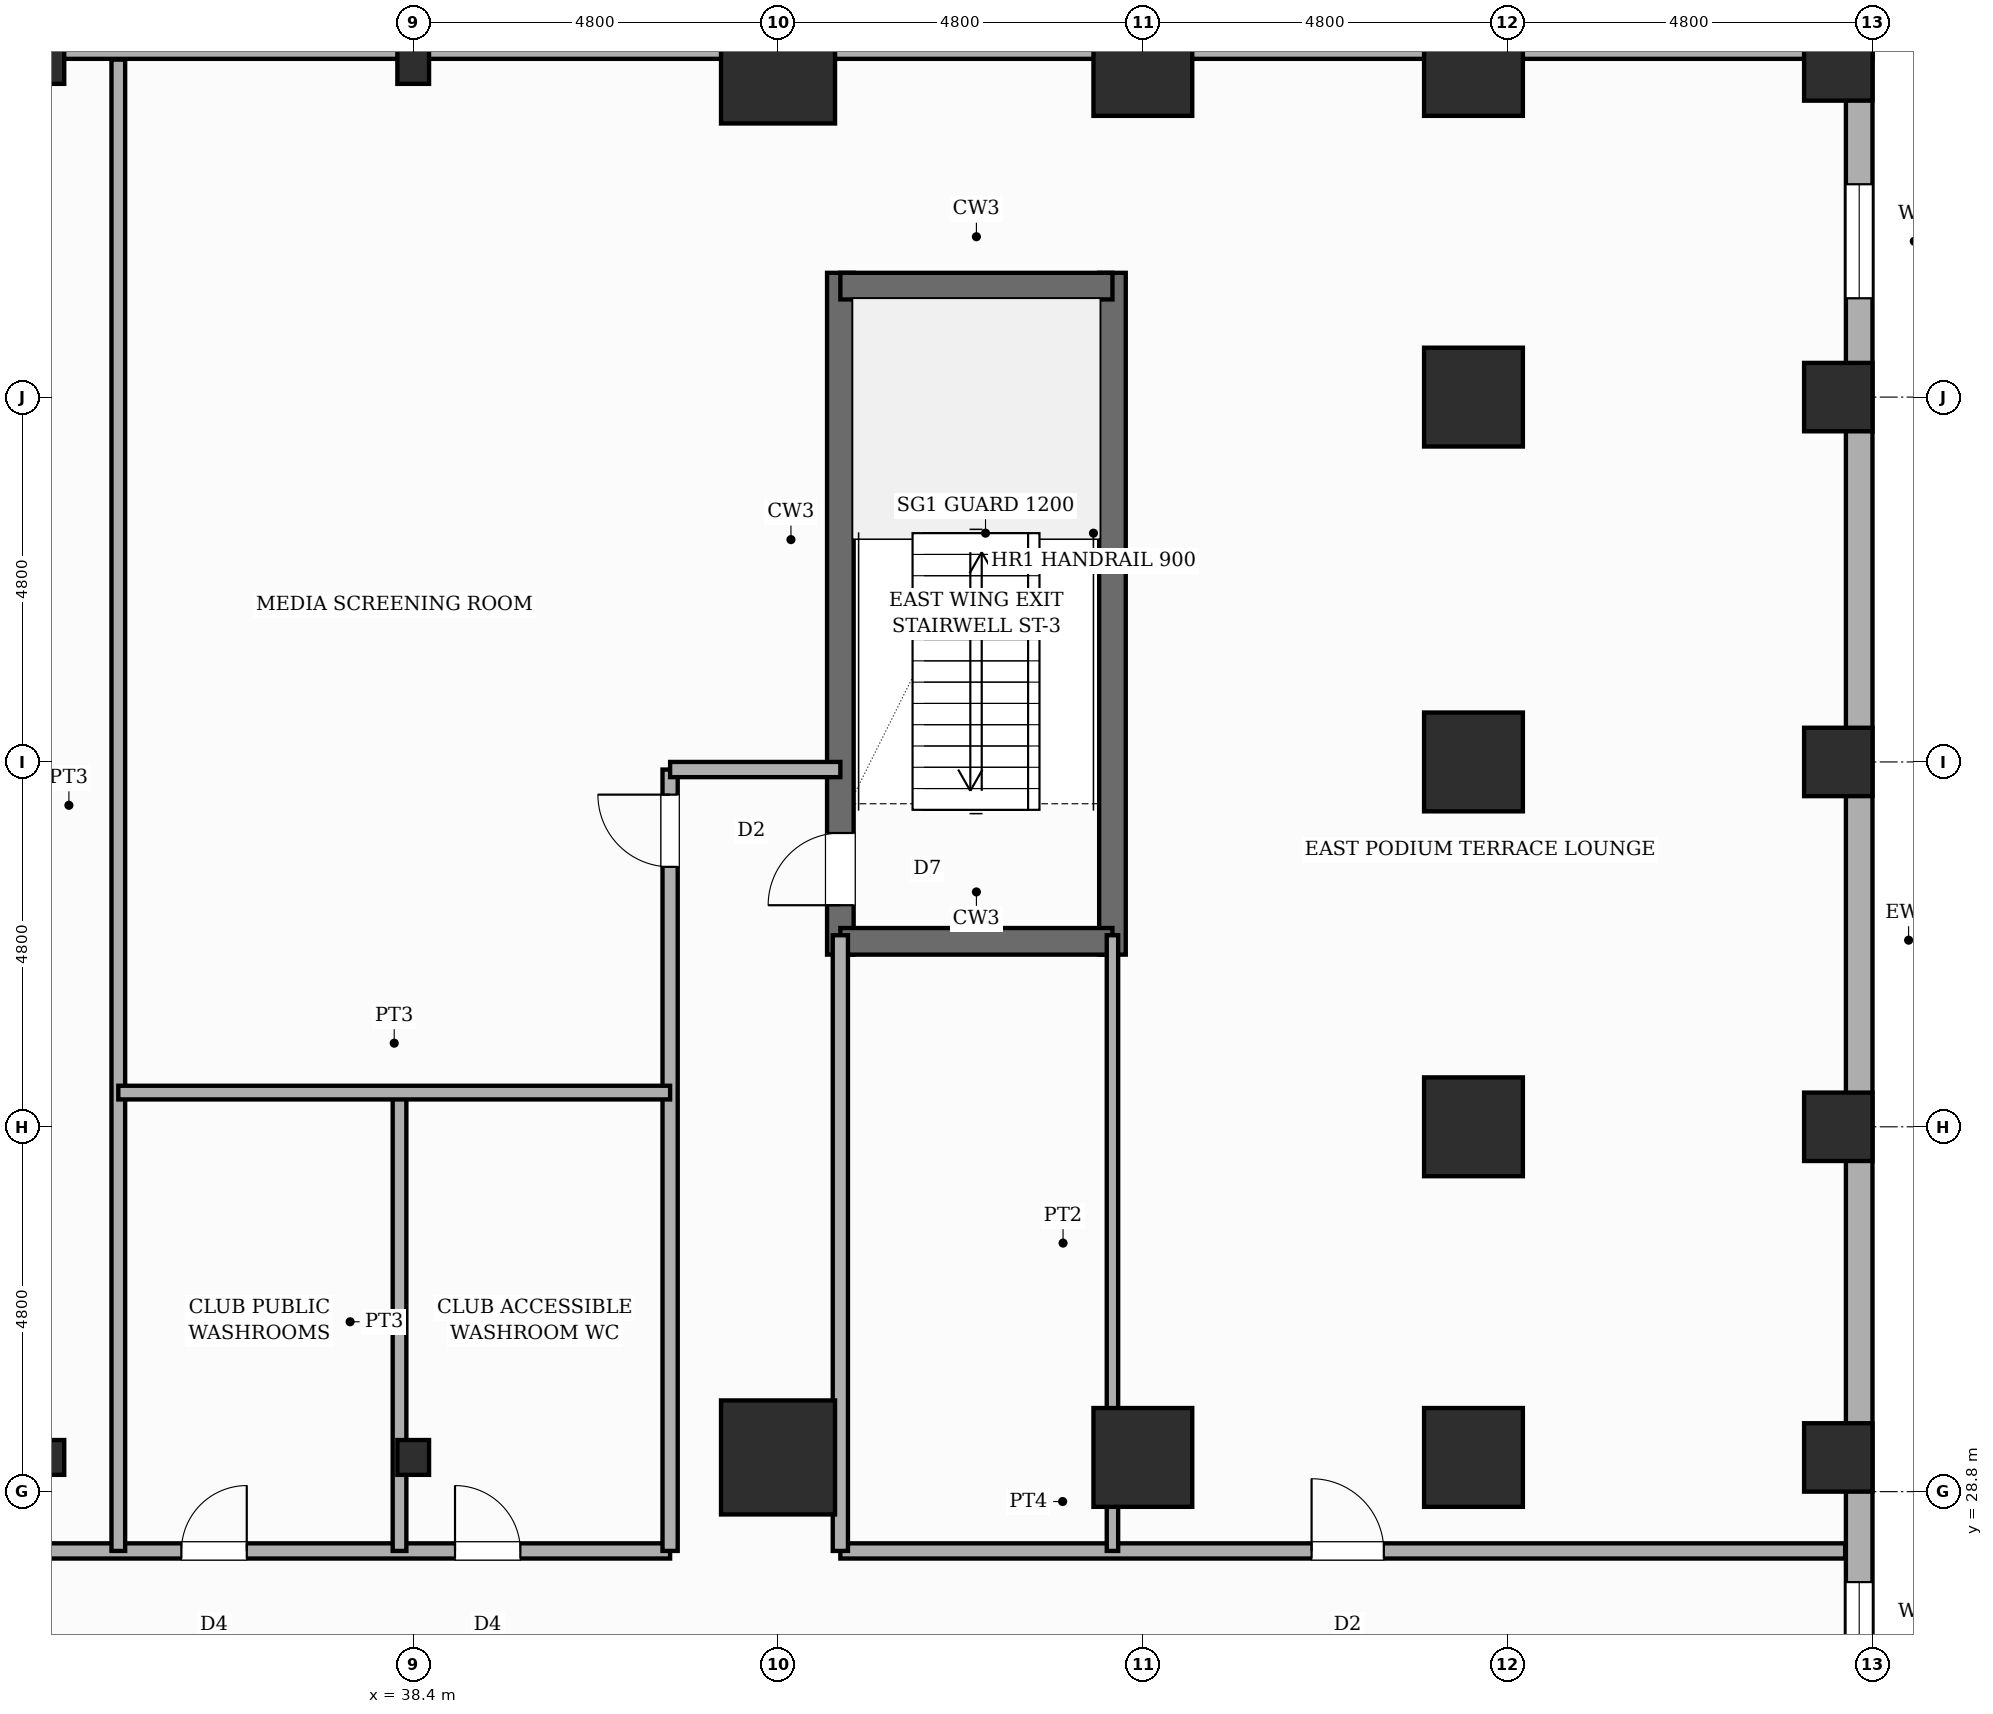
"""IFC4 building model, lengths in metres.
Left out: names, types, materials, properties, quantities, classifications, styles, units other than length and angle.
Written with IfcOpenShell. Run it as: python <this file> out.ifc"""

import sys

from ifc_helpers import new_model, si_unit, direction, frame, frame_2d, origin, origin_2d, place, context, subcontext, project, spatial, rectangle, circle, i_section, extrude, element, fill, save


model = new_model("IFC4")
c1 = context("Model", 3, precision=1e-05, world=origin(), true_north=direction((0.0, 1.0)))
c2 = subcontext(c1, "Body", "Model", "MODEL_VIEW")
j1 = project(units=[si_unit("LENGTHUNIT", "METRE"), si_unit("PLANEANGLEUNIT", "RADIAN")], contexts=[c1])
p1 = place(None, origin())
s1 = spatial("IfcSite", under=j1, at=p1, CompositionType="ELEMENT")
p2 = place(p1, origin())
s2 = spatial("IfcBuilding", under=s1, at=p2, CompositionType="ELEMENT")
p3 = place(p2, frame((0.0, 0.0, 14.8)))
s3 = spatial("IfcBuildingStorey", under=s2, at=p3, CompositionType="ELEMENT", Elevation=14.8)
p4 = place(p3, frame((44.02, 35.865, 0.0), z_axis=(0.0, 0.0, 1.0), x_axis=(0.0, 1.0, 0.0)))
e1 = element("IfcWall", 1, at=p4, inside=s3, PredefinedType="SHEAR", context=c2, shape_type="SweptSolid", body=[
    extrude(rectangle(XDim=8.97, YDim=0.35, at=frame_2d((4.485, 0.0))), origin(), (0.0, 0.0, 1.0), 4.8),
])
p5 = place(p4, frame((0.65, 0.0, 0.0)))
e2 = element("IfcOpeningElement", 2, at=p5, cuts=e1, PredefinedType="OPENING", context=c2, shape_type="SweptSolid", body=[
    extrude(rectangle(XDim=0.95, YDim=2.1, at=frame_2d((0.475, 1.05))), frame((0.0, 0.185, 0.0), z_axis=(0.0, -1.0, 0.0), x_axis=(1.0, 0.0, 0.0)), (0.0, 0.0, 1.0), 0.37),
])
p6 = place(p3, frame((47.6, 35.865, 0.0), z_axis=(0.0, 0.0, 1.0), x_axis=(0.0, 1.0, 0.0)))
e3 = element("IfcWall", 3, at=p6, inside=s3, PredefinedType="SHEAR", context=c2, shape_type="SweptSolid", body=[
    extrude(rectangle(XDim=8.97, YDim=0.35, at=frame_2d((4.485, 0.0))), origin(), (0.0, 0.0, 1.0), 4.8),
])
for number, where, z_axis, x_axis in (
    (4, (44.02, 36.04, 0.0), (0.0, 0.0, 1.0), (1.0, 0.0, 0.0)),
    (5, (44.02, 44.66, 0.0), (0.0, 0.0, 1.0), (1.0, 0.0, 0.0)),
):
    element("IfcWall", number, at=place(p3, frame(where, z_axis=z_axis, x_axis=x_axis)), inside=s3, PredefinedType="SHEAR", context=c2, shape_type="SweptSolid", body=[
        extrude(rectangle(XDim=3.58, YDim=0.35, at=frame_2d((1.79, 0.0))), origin(), (0.0, 0.0, 1.0), 4.8),
    ])
for number, where, z_axis, x_axis in (
    (6, (33.6, 29.25, 0.0), (0.0, 0.0, 1.0), (1.0, 0.0, 0.0)),
    (7, (33.6, 47.55, 0.0), (0.0, 0.0, 1.0), (1.0, 0.0, 0.0)),
    (8, (38.4, 29.25, 0.0), (0.0, 0.0, 1.0), (1.0, 0.0, 0.0)),
    (9, (38.4, 47.55, 0.0), (0.0, 0.0, 1.0), (1.0, 0.0, 0.0)),
):
    element("IfcColumn", number, at=place(p3, frame(where, z_axis=z_axis, x_axis=x_axis)), inside=s3, PredefinedType="COLUMN", context=c2, shape_type="SweptSolid", body=[
        extrude(i_section(OverallWidth=0.417, OverallDepth=0.458, WebThickness=0.03, FlangeThickness=0.045, FilletRadius=0.022, at=origin_2d()), origin(), (0.0, 0.0, 1.0), 4.8),
    ])
for number, where, z_axis, x_axis in (
    (10, (43.2, 29.25, 0.0), (0.0, 0.0, 1.0), (1.0, 0.0, 0.0)),
    (11, (43.2, 47.55, 0.0), (0.0, 0.0, 1.0), (1.0, 0.0, 0.0)),
):
    element("IfcColumn", number, at=place(p3, frame(where, z_axis=z_axis, x_axis=x_axis)), inside=s3, PredefinedType="USERDEFINED", context=c2, shape_type="SweptSolid", body=[
        extrude(rectangle(XDim=1.5, YDim=1.5, at=origin_2d()), origin(), (0.0, 0.0, 1.0), 4.8),
    ])
for number, where, z_axis, x_axis in (
    (12, (48.0, 29.25, 0.0), (0.0, 0.0, 1.0), (1.0, 0.0, 0.0)),
    (13, (48.0, 47.55, 0.0), (0.0, 0.0, 1.0), (1.0, 0.0, 0.0)),
    (14, (52.35, 29.25, 0.0), (0.0, 0.0, 1.0), (1.0, 0.0, 0.0)),
    (15, (52.35, 33.6, 0.0), (0.0, 0.0, 1.0), (1.0, 0.0, 0.0)),
    (16, (52.35, 38.4, 0.0), (0.0, 0.0, 1.0), (1.0, 0.0, 0.0)),
    (17, (52.35, 43.2, 0.0), (0.0, 0.0, 1.0), (1.0, 0.0, 0.0)),
    (18, (52.35, 47.55, 0.0), (0.0, 0.0, 1.0), (1.0, 0.0, 0.0)),
):
    element("IfcColumn", number, at=place(p3, frame(where, z_axis=z_axis, x_axis=x_axis)), inside=s3, PredefinedType="COLUMN", context=c2, shape_type="SweptSolid", body=[
        extrude(rectangle(XDim=1.3, YDim=1.3, at=origin_2d()), origin(), (0.0, 0.0, 1.0), 4.8),
    ])
for number, where, z_axis, x_axis in (
    (19, (57.15, 29.25, 0.0), (0.0, 0.0, 1.0), (1.0, 0.0, 0.0)),
    (20, (57.15, 33.6, 0.0), (0.0, 0.0, 1.0), (1.0, 0.0, 0.0)),
    (21, (57.15, 38.4, 0.0), (0.0, 0.0, 1.0), (1.0, 0.0, 0.0)),
    (22, (57.15, 43.2, 0.0), (0.0, 0.0, 1.0), (1.0, 0.0, 0.0)),
    (23, (57.15, 47.55, 0.0), (0.0, 0.0, 1.0), (1.0, 0.0, 0.0)),
):
    element("IfcColumn", number, at=place(p3, frame(where, z_axis=z_axis, x_axis=x_axis)), inside=s3, PredefinedType="COLUMN", context=c2, shape_type="SweptSolid", body=[
        extrude(circle(Radius=0.45, at=origin_2d()), origin(), (0.0, 0.0, 1.0), 4.8),
    ])
p7 = place(p3, frame((0.0, 47.825, 0.0), z_axis=(0.0, 0.0, 1.0), x_axis=(1.0, 0.0, 0.0)))
e24 = element("IfcWall", 24, at=p7, inside=s3, PredefinedType="STANDARD", context=c2, shape_type="SweptSolid", body=[
    extrude(rectangle(XDim=57.6, YDim=0.35, at=frame_2d((28.8, 0.0))), origin(), (0.0, 0.0, 1.0), 2.98),
])
p8 = place(p3, frame((57.425, 48.0, 0.0), z_axis=(0.0, 0.0, 1.0), x_axis=(0.0, -1.0, 0.0)))
e25 = element("IfcWall", 25, at=p8, inside=s3, PredefinedType="STANDARD", context=c2, shape_type="SweptSolid", body=[
    extrude(rectangle(XDim=38.4, YDim=0.35, at=frame_2d((19.2, 0.0))), origin(), (0.0, 0.0, 1.0), 3.48),
])
p9 = place(p8, frame((20.39, 0.0, 0.85)))
e26 = element("IfcOpeningElement", 26, at=p9, cuts=e25, PredefinedType="OPENING", context=c2, shape_type="SweptSolid", body=[
    extrude(rectangle(XDim=1.5, YDim=2.1, at=frame_2d((0.75, 1.05))), frame((0.0, 0.185, 0.0), z_axis=(0.0, -1.0, 0.0), x_axis=(1.0, 0.0, 0.0)), (0.0, 0.0, 1.0), 0.37),
])
p10 = place(p8, frame((2.0, 0.0, 0.85)))
e27 = element("IfcOpeningElement", 27, at=p10, cuts=e25, PredefinedType="OPENING", context=c2, shape_type="SweptSolid", body=[
    extrude(rectangle(XDim=1.5, YDim=2.1, at=frame_2d((0.75, 1.05))), frame((0.0, 0.185, 0.0), z_axis=(0.0, -1.0, 0.0), x_axis=(1.0, 0.0, 0.0)), (0.0, 0.0, 1.0), 0.37),
])
p11 = place(p8, frame((24.585, 0.0, 0.85)))
e28 = element("IfcOpeningElement", 28, at=p11, cuts=e25, PredefinedType="OPENING", context=c2, shape_type="SweptSolid", body=[
    extrude(rectangle(XDim=1.5, YDim=2.1, at=frame_2d((0.75, 1.05))), frame((0.0, 0.185, 0.0), z_axis=(0.0, -1.0, 0.0), x_axis=(1.0, 0.0, 0.0)), (0.0, 0.0, 1.0), 0.37),
])
p12 = place(p3, frame((22.75, 28.02, 0.0), z_axis=(0.0, 0.0, 1.0), x_axis=(1.0, 0.0, 0.0)))
e29 = element("IfcWall", 29, at=p12, inside=s3, PredefinedType="PARTITIONING", context=c2, shape_type="SweptSolid", body=[
    extrude(rectangle(XDim=19.03, YDim=0.2, at=frame_2d((9.515, 0.0))), origin(), (0.0, 0.0, 1.0), 4.4),
])
p13 = place(p12, frame((4.65, 0.0, 0.0)))
e30 = element("IfcOpeningElement", 30, at=p13, cuts=e29, PredefinedType="OPENING", context=c2, shape_type="SweptSolid", body=[
    extrude(rectangle(XDim=0.95, YDim=2.15, at=frame_2d((0.475, 1.075))), frame((0.0, 0.11, 0.0), z_axis=(0.0, -1.0, 0.0), x_axis=(1.0, 0.0, 0.0)), (0.0, 0.0, 1.0), 0.22),
])
p14 = place(p12, frame((12.6, 0.0, 0.0)))
e31 = element("IfcOpeningElement", 31, at=p14, cuts=e29, PredefinedType="OPENING", context=c2, shape_type="SweptSolid", body=[
    extrude(rectangle(XDim=0.86, YDim=2.1, at=frame_2d((0.43, 1.05))), frame((0.0, 0.11, 0.0), z_axis=(0.0, -1.0, 0.0), x_axis=(1.0, 0.0, 0.0)), (0.0, 0.0, 1.0), 0.22),
])
p15 = place(p12, frame((16.2, 0.0, 0.0)))
e32 = element("IfcOpeningElement", 32, at=p15, cuts=e29, PredefinedType="OPENING", context=c2, shape_type="SweptSolid", body=[
    extrude(rectangle(XDim=0.86, YDim=2.1, at=frame_2d((0.43, 1.05))), frame((0.0, 0.11, 0.0), z_axis=(0.0, -1.0, 0.0), x_axis=(1.0, 0.0, 0.0)), (0.0, 0.0, 1.0), 0.22),
])
p16 = place(p3, frame((44.02, 28.02, 0.0), z_axis=(0.0, 0.0, 1.0), x_axis=(1.0, 0.0, 0.0)))
e33 = element("IfcWall", 33, at=p16, inside=s3, PredefinedType="PARTITIONING", context=c2, shape_type="SweptSolid", body=[
    extrude(rectangle(XDim=13.22, YDim=0.2, at=frame_2d((6.61, 0.0))), origin(), (0.0, 0.0, 1.0), 4.4),
])
p17 = place(p16, frame((6.2, 0.0, 0.0)))
e34 = element("IfcOpeningElement", 34, at=p17, cuts=e33, PredefinedType="OPENING", context=c2, shape_type="SweptSolid", body=[
    extrude(rectangle(XDim=0.95, YDim=2.15, at=frame_2d((0.475, 1.075))), frame((0.0, 0.11, 0.0), z_axis=(0.0, -1.0, 0.0), x_axis=(1.0, 0.0, 0.0)), (0.0, 0.0, 1.0), 0.22),
])
p18 = place(p3, frame((41.78, 28.02, 0.0), z_axis=(0.0, 0.0, 1.0), x_axis=(0.0, 1.0, 0.0)))
e35 = element("IfcWall", 35, at=p18, inside=s3, PredefinedType="PARTITIONING", context=c2, shape_type="SweptSolid", body=[
    extrude(rectangle(XDim=10.28, YDim=0.2, at=frame_2d((5.14, 0.0))), origin(), (0.0, 0.0, 1.0), 4.4),
])
p19 = place(p18, frame((9.0, 0.0, 0.0)))
e36 = element("IfcOpeningElement", 36, at=p19, cuts=e35, PredefinedType="OPENING", context=c2, shape_type="SweptSolid", body=[
    extrude(rectangle(XDim=0.95, YDim=2.15, at=frame_2d((0.475, 1.075))), frame((0.0, 0.11, 0.0), z_axis=(0.0, -1.0, 0.0), x_axis=(1.0, 0.0, 0.0)), (0.0, 0.0, 1.0), 0.22),
])
p20 = place(p3, frame((44.02, 28.02, 0.0), z_axis=(0.0, 0.0, 1.0), x_axis=(0.0, 1.0, 0.0)))
e37 = element("IfcWall", 37, at=p20, inside=s3, PredefinedType="PARTITIONING", context=c2, shape_type="SweptSolid", body=[
    extrude(rectangle(XDim=8.1, YDim=0.2, at=frame_2d((4.05, 0.0))), origin(), (0.0, 0.0, 1.0), 4.4),
])
p21 = place(p3, frame((41.78, 38.3, 0.0), z_axis=(0.0, 0.0, 1.0), x_axis=(1.0, 0.0, 0.0)))
e38 = element("IfcWall", 38, at=p21, inside=s3, PredefinedType="PARTITIONING", context=c2, shape_type="SweptSolid", body=[
    extrude(rectangle(XDim=2.24, YDim=0.2, at=frame_2d((1.12, 0.0))), origin(), (0.0, 0.0, 1.0), 4.4),
])
p22 = place(p3, frame((47.6, 28.02, 0.0), z_axis=(0.0, 0.0, 1.0), x_axis=(0.0, 1.0, 0.0)))
e39 = element("IfcWall", 39, at=p22, inside=s3, PredefinedType="PARTITIONING", context=c2, shape_type="SweptSolid", body=[
    extrude(rectangle(XDim=8.1, YDim=0.15, at=frame_2d((4.05, 0.0))), origin(), (0.0, 0.0, 1.0), 4.4),
])
p23 = place(p3, frame((34.52, 28.02, 0.0), z_axis=(0.0, 0.0, 1.0), x_axis=(0.0, 1.0, 0.0)))
e40 = element("IfcWall", 40, at=p23, inside=s3, PredefinedType="PLUMBINGWALL", context=c2, shape_type="SweptSolid", body=[
    extrude(rectangle(XDim=19.62, YDim=0.18, at=frame_2d((9.81, 0.0))), origin(), (0.0, 0.0, 1.0), 4.4),
])
p24 = place(p3, frame((38.22, 28.02, 0.0), z_axis=(0.0, 0.0, 1.0), x_axis=(0.0, 1.0, 0.0)))
e41 = element("IfcWall", 41, at=p24, inside=s3, PredefinedType="PLUMBINGWALL", context=c2, shape_type="SweptSolid", body=[
    extrude(rectangle(XDim=6.03, YDim=0.18, at=frame_2d((3.015, 0.0))), origin(), (0.0, 0.0, 1.0), 3.48),
])
p25 = place(p3, frame((34.52, 34.05, 0.0), z_axis=(0.0, 0.0, 1.0), x_axis=(1.0, 0.0, 0.0)))
e42 = element("IfcWall", 42, at=p25, inside=s3, PredefinedType="PLUMBINGWALL", context=c2, shape_type="SweptSolid", body=[
    extrude(rectangle(XDim=7.26, YDim=0.18, at=frame_2d((3.63, 0.0))), origin(), (0.0, 0.0, 1.0), 4.4),
])
p26 = place(p9, origin())
e43 = element("IfcWindow", 43, at=p26, inside=s3, PartitioningType="SINGLE_PANEL", PredefinedType="WINDOW", context=c2, shape_type="SweptSolid", body=[
    extrude(rectangle(XDim=1.5, YDim=2.1, at=frame_2d((0.75, 1.05))), frame((0.0, 0.03, 0.0), z_axis=(0.0, -1.0, 0.0), x_axis=(1.0, 0.0, 0.0)), (0.0, 0.0, 1.0), 0.06),
])
fill(e26, e43)
p27 = place(p10, origin())
e44 = element("IfcWindow", 44, at=p27, inside=s3, PartitioningType="SINGLE_PANEL", PredefinedType="WINDOW", context=c2, shape_type="SweptSolid", body=[
    extrude(rectangle(XDim=1.5, YDim=2.1, at=frame_2d((0.75, 1.05))), frame((0.0, 0.03, 0.0), z_axis=(0.0, -1.0, 0.0), x_axis=(1.0, 0.0, 0.0)), (0.0, 0.0, 1.0), 0.06),
])
fill(e27, e44)
p28 = place(p5, origin())
e45 = element("IfcDoor", 45, at=p28, inside=s3, OperationType="SINGLE_SWING_LEFT", PredefinedType="DOOR", context=c2, shape_type="SweptSolid", body=[
    extrude(rectangle(XDim=0.95, YDim=2.1, at=frame_2d((0.475, 1.05))), frame((0.0, 0.025, 0.0), z_axis=(0.0, -1.0, 0.0), x_axis=(1.0, 0.0, 0.0)), (0.0, 0.0, 1.0), 0.05),
])
fill(e2, e45)
p29 = place(p17, origin())
e46 = element("IfcDoor", 46, at=p29, inside=s3, OperationType="SINGLE_SWING_LEFT", PredefinedType="DOOR", context=c2, shape_type="SweptSolid", body=[
    extrude(rectangle(XDim=0.95, YDim=2.15, at=frame_2d((0.475, 1.075))), frame((0.0, 0.025, 0.0), z_axis=(0.0, -1.0, 0.0), x_axis=(1.0, 0.0, 0.0)), (0.0, 0.0, 1.0), 0.05),
])
fill(e34, e46)
p30 = place(p14, origin())
e47 = element("IfcDoor", 47, at=p30, inside=s3, OperationType="SINGLE_SWING_RIGHT", PredefinedType="DOOR", context=c2, shape_type="SweptSolid", body=[
    extrude(rectangle(XDim=0.86, YDim=2.1, at=frame_2d((0.43, 1.05))), frame((0.0, 0.025, 0.0), z_axis=(0.0, -1.0, 0.0), x_axis=(1.0, 0.0, 0.0)), (0.0, 0.0, 1.0), 0.05),
])
fill(e31, e47)
p31 = place(p15, origin())
e48 = element("IfcDoor", 48, at=p31, inside=s3, OperationType="SINGLE_SWING_LEFT", PredefinedType="DOOR", context=c2, shape_type="SweptSolid", body=[
    extrude(rectangle(XDim=0.86, YDim=2.1, at=frame_2d((0.43, 1.05))), frame((0.0, 0.025, 0.0), z_axis=(0.0, -1.0, 0.0), x_axis=(1.0, 0.0, 0.0)), (0.0, 0.0, 1.0), 0.05),
])
fill(e32, e48)
p32 = place(p19, origin())
e49 = element("IfcDoor", 49, at=p32, inside=s3, OperationType="SINGLE_SWING_RIGHT", PredefinedType="DOOR", context=c2, shape_type="SweptSolid", body=[
    extrude(rectangle(XDim=0.95, YDim=2.15, at=frame_2d((0.475, 1.075))), frame((0.0, 0.025, 0.0), z_axis=(0.0, -1.0, 0.0), x_axis=(1.0, 0.0, 0.0)), (0.0, 0.0, 1.0), 0.05),
])
fill(e36, e49)
save(model, sys.argv[1])
